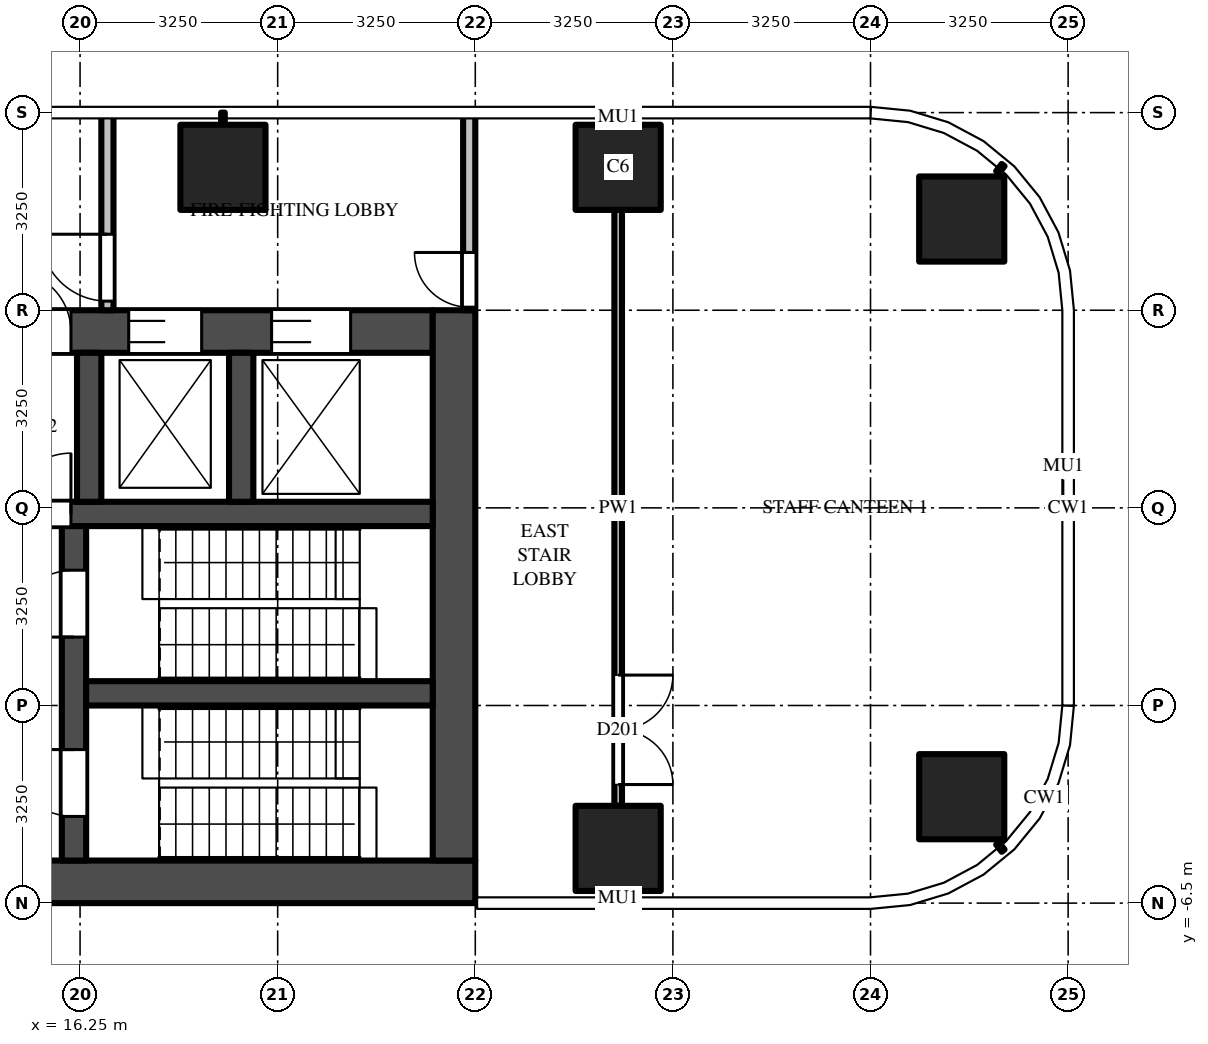
"""IFC4 building model, lengths in metres.
Left out: names, types, materials, properties, quantities, classifications, styles, units other than length and angle.
Written with IfcOpenShell. Run it as: python <this file> out.ifc"""

import sys

from ifc_helpers import new_model, si_unit, direction, frame, frame_2d, origin, origin_2d, place, context, subcontext, project, spatial, rectangle, extrude, source, transform, mapped, element, fill, save


model = new_model("IFC4")
c1 = context("Model", 3, precision=1e-05, world=origin(), true_north=direction((0.0, 1.0)))
c2 = subcontext(c1, "Body", "Model", "MODEL_VIEW")
j1 = project(units=[si_unit("LENGTHUNIT", "METRE"), si_unit("PLANEANGLEUNIT", "RADIAN")], contexts=[c1])
p1 = place(None, origin())
s1 = spatial("IfcSite", under=j1, at=p1, CompositionType="ELEMENT")
p2 = place(p1, origin())
s2 = spatial("IfcBuilding", under=s1, at=p2, CompositionType="ELEMENT")
p3 = place(p2, frame((0.0, 0.0, 83.5)))
s3 = spatial("IfcBuildingStorey", under=s2, at=p3, CompositionType="ELEMENT", Elevation=83.5)
m1 = source(origin(), c2, "Body", "SweptSolid", [
    extrude(rectangle(XDim=1.4, YDim=1.4, at=origin_2d()), origin(), (0.0, 0.0, 1.0), 4.5),
])
for number, where, z_axis, x_axis in (
    (1, (18.6, 5.6, 0.0), (0.0, 0.0, 1.0), (1.0, 0.0, 0.0)),
    (2, (25.1, 5.6, 0.0), (0.0, 0.0, 1.0), (1.0, 0.0, 0.0)),
    (3, (30.75, 4.75, 0.0), (0.0, 0.0, 1.0), (1.0, 0.0, 0.0)),
    (4, (25.1, -5.6, 0.0), (0.0, 0.0, 1.0), (1.0, 0.0, 0.0)),
    (5, (30.75, -4.75, 0.0), (0.0, 0.0, 1.0), (1.0, 0.0, 0.0)),
):
    element("IfcColumn", number, at=place(p3, frame(where, z_axis=z_axis, x_axis=x_axis)), inside=s3, PredefinedType="COLUMN", context=c2, shape_type="MappedRepresentation", body=[
        mapped(m1, transform((0.0, 0.0, 0.0))),
    ])
m2 = source(origin(), c2, "Body", "SweptSolid", [
    extrude(rectangle(XDim=16.45, YDim=0.7, at=frame_2d((8.225, 0.0))), origin(), (0.0, 0.0, 1.0), 4.25),
])
p4 = place(p3, frame((6.3, -6.15, 0.0), z_axis=(0.0, 0.0, 1.0), x_axis=(1.0, 0.0, 0.0)))
e6 = element("IfcWall", 6, at=p4, inside=s3, PredefinedType="SHEAR", context=c2, shape_type="MappedRepresentation", body=[
    mapped(m2, transform((0.0, 0.0, 0.0))),
])
m3 = source(origin(), c2, "Body", "SweptSolid", [
    extrude(rectangle(XDim=14.85, YDim=0.7, at=frame_2d((7.425, 0.0))), origin(), (0.0, 0.0, 1.0), 4.25),
])
p5 = place(p3, frame((7.2, 2.9, 0.0), z_axis=(0.0, 0.0, 1.0), x_axis=(1.0, 0.0, 0.0)))
e7 = element("IfcWall", 7, at=p5, inside=s3, PredefinedType="SHEAR", context=c2, shape_type="MappedRepresentation", body=[
    mapped(m3, transform((0.0, 0.0, 0.0))),
])
m4 = source(origin(), c2, "Body", "SweptSolid", [
    extrude(rectangle(XDim=1.3, YDim=2.1, at=frame_2d((0.65, 1.05))), frame((0.0, 0.36, 0.0), z_axis=(0.0, -1.0, 0.0), x_axis=(1.0, 0.0, 0.0)), (0.0, 0.0, 1.0), 0.72),
])
p6 = place(p5, frame((12.2, 0.0, 0.0)))
e8 = element("IfcOpeningElement", 8, at=p6, cuts=e7, PredefinedType="OPENING", context=c2, shape_type="MappedRepresentation", body=[
    mapped(m4, transform((0.0, 0.0, 0.0))),
])
m5 = source(origin(), c2, "Body", "SweptSolid", [
    extrude(rectangle(XDim=1.2, YDim=2.1, at=frame_2d((0.6, 1.05))), frame((0.0, 0.36, 0.0), z_axis=(0.0, -1.0, 0.0), x_axis=(1.0, 0.0, 0.0)), (0.0, 0.0, 1.0), 0.72),
])
p7 = place(p5, frame((9.85, 0.0, 0.0)))
e9 = element("IfcOpeningElement", 9, at=p7, cuts=e7, PredefinedType="OPENING", context=c2, shape_type="MappedRepresentation", body=[
    mapped(m5, transform((0.0, 0.0, 0.0))),
])
m6 = source(origin(), c2, "Body", "SweptSolid", [
    extrude(rectangle(XDim=1.0, YDim=2.1, at=frame_2d((0.5, 1.05))), frame((0.0, 0.36, 0.0), z_axis=(0.0, -1.0, 0.0), x_axis=(1.0, 0.0, 0.0)), (0.0, 0.0, 1.0), 0.72),
])
p8 = place(p5, frame((7.9, 0.0, 0.0)))
e10 = element("IfcOpeningElement", 10, at=p8, cuts=e7, PredefinedType="OPENING", context=c2, shape_type="MappedRepresentation", body=[
    mapped(m6, transform((0.0, 0.0, 0.0))),
])
m7 = source(origin(), c2, "Body", "SweptSolid", [
    extrude(rectangle(XDim=0.8, YDim=2.1, at=frame_2d((0.4, 1.05))), frame((0.0, 0.36, 0.0), z_axis=(0.0, -1.0, 0.0), x_axis=(1.0, 0.0, 0.0)), (0.0, 0.0, 1.0), 0.72),
])
p9 = place(p5, frame((0.113, 0.0, 0.0)))
e11 = element("IfcOpeningElement", 11, at=p9, cuts=e7, PredefinedType="OPENING", context=c2, shape_type="MappedRepresentation", body=[
    mapped(m7, transform((0.0, 0.0, 0.0))),
])
p10 = place(p5, frame((1.288, 0.0, 0.0)))
e12 = element("IfcOpeningElement", 12, at=p10, cuts=e7, PredefinedType="OPENING", context=c2, shape_type="MappedRepresentation", body=[
    mapped(m7, transform((0.0, 0.0, 0.0))),
])
p11 = place(p5, frame((2.712, 0.0, 0.0)))
e13 = element("IfcOpeningElement", 13, at=p11, cuts=e7, PredefinedType="OPENING", context=c2, shape_type="MappedRepresentation", body=[
    mapped(m7, transform((0.0, 0.0, 0.0))),
])
p12 = place(p5, frame((3.887, 0.0, 0.0)))
e14 = element("IfcOpeningElement", 14, at=p12, cuts=e7, PredefinedType="OPENING", context=c2, shape_type="MappedRepresentation", body=[
    mapped(m7, transform((0.0, 0.0, 0.0))),
])
p13 = place(p5, frame((5.312, 0.0, 0.0)))
e15 = element("IfcOpeningElement", 15, at=p13, cuts=e7, PredefinedType="OPENING", context=c2, shape_type="MappedRepresentation", body=[
    mapped(m7, transform((0.0, 0.0, 0.0))),
])
p14 = place(p5, frame((6.488, 0.0, 0.0)))
e16 = element("IfcOpeningElement", 16, at=p14, cuts=e7, PredefinedType="OPENING", context=c2, shape_type="MappedRepresentation", body=[
    mapped(m7, transform((0.0, 0.0, 0.0))),
])
m8 = source(origin(), c2, "Body", "SweptSolid", [
    extrude(rectangle(XDim=9.05, YDim=0.7, at=frame_2d((4.525, 0.0))), origin(), (0.0, 0.0, 1.0), 4.25),
])
p15 = place(p3, frame((22.4, -5.8, 0.0), z_axis=(0.0, 0.0, 1.0), x_axis=(0.0, 1.0, 0.0)))
e17 = element("IfcWall", 17, at=p15, inside=s3, PredefinedType="SHEAR", context=c2, shape_type="MappedRepresentation", body=[
    mapped(m8, transform((0.0, 0.0, 0.0))),
])
m9 = source(origin(), c2, "Body", "SweptSolid", [
    extrude(rectangle(XDim=14.85, YDim=0.4, at=frame_2d((7.425, 0.0))), origin(), (0.0, 0.0, 1.0), 4.25),
])
p16 = place(p3, frame((7.2, -0.1, 0.0), z_axis=(0.0, 0.0, 1.0), x_axis=(1.0, 0.0, 0.0)))
e18 = element("IfcWall", 18, at=p16, inside=s3, PredefinedType="SHEAR", context=c2, shape_type="MappedRepresentation", body=[
    mapped(m9, transform((0.0, 0.0, 0.0))),
])
m10 = source(origin(), c2, "Body", "SweptSolid", [
    extrude(rectangle(XDim=1.0, YDim=2.1, at=frame_2d((0.5, 1.05))), frame((0.0, 0.21, 0.0), z_axis=(0.0, -1.0, 0.0), x_axis=(1.0, 0.0, 0.0)), (0.0, 0.0, 1.0), 0.42),
])
p17 = place(p16, frame((7.9, 0.0, 0.0)))
e19 = element("IfcOpeningElement", 19, at=p17, cuts=e18, PredefinedType="OPENING", context=c2, shape_type="MappedRepresentation", body=[
    mapped(m10, transform((0.0, 0.0, 0.0))),
])
m11 = source(origin(), c2, "Body", "SweptSolid", [
    extrude(rectangle(XDim=5.5, YDim=0.4, at=frame_2d((2.75, 0.0))), origin(), (0.0, 0.0, 1.0), 4.25),
])
p18 = place(p3, frame((16.15, -5.8, 0.0), z_axis=(0.0, 0.0, 1.0), x_axis=(0.0, 1.0, 0.0)))
e20 = element("IfcWall", 20, at=p18, inside=s3, PredefinedType="SHEAR", context=c2, shape_type="MappedRepresentation", body=[
    mapped(m11, transform((0.0, 0.0, 0.0))),
])
m12 = source(origin(), c2, "Body", "SweptSolid", [
    extrude(rectangle(XDim=1.1, YDim=2.1, at=frame_2d((0.55, 1.05))), frame((0.0, 0.21, 0.0), z_axis=(0.0, -1.0, 0.0), x_axis=(1.0, 0.0, 0.0)), (0.0, 0.0, 1.0), 0.42),
])
p19 = place(p18, frame((0.725, 0.0, 0.0)))
e21 = element("IfcOpeningElement", 21, at=p19, cuts=e20, PredefinedType="OPENING", context=c2, shape_type="MappedRepresentation", body=[
    mapped(m12, transform((0.0, 0.0, 0.0))),
])
p20 = place(p18, frame((3.675, 0.0, 0.0)))
e22 = element("IfcOpeningElement", 22, at=p20, cuts=e20, PredefinedType="OPENING", context=c2, shape_type="MappedRepresentation", body=[
    mapped(m12, transform((0.0, 0.0, 0.0))),
])
m13 = source(origin(), c2, "Body", "SweptSolid", [
    extrude(rectangle(XDim=5.7, YDim=0.4, at=frame_2d((2.85, 0.0))), origin(), (0.0, 0.0, 1.0), 4.25),
])
p21 = place(p3, frame((16.35, -3.05, 0.0), z_axis=(0.0, 0.0, 1.0), x_axis=(1.0, 0.0, 0.0)))
e23 = element("IfcWall", 23, at=p21, inside=s3, PredefinedType="SHEAR", context=c2, shape_type="MappedRepresentation", body=[
    mapped(m13, transform((0.0, 0.0, 0.0))),
])
m14 = source(origin(), c2, "Body", "SweptSolid", [
    extrude(rectangle(XDim=2.45, YDim=0.4, at=frame_2d((1.225, 0.0))), origin(), (0.0, 0.0, 1.0), 4.25),
])
for number, where, z_axis, x_axis in (
    (24, (16.4, 0.1, 0.0), (0.0, 0.0, 1.0), (0.0, 1.0, 0.0)),
    (25, (18.9, 0.1, 0.0), (0.0, 0.0, 1.0), (0.0, 1.0, 0.0)),
):
    element("IfcWall", number, at=place(p3, frame(where, z_axis=z_axis, x_axis=x_axis)), inside=s3, PredefinedType="SHEAR", context=c2, shape_type="MappedRepresentation", body=[
        mapped(m14, transform((0.0, 0.0, 0.0))),
    ])
m15 = source(origin(), c2, "Body", "SweptSolid", [
    extrude(rectangle(XDim=3.25, YDim=0.2, at=frame_2d((1.625, 0.0))), origin(), (0.0, 0.0, 1.0), 4.25),
])
p22 = place(p3, frame((16.7, 3.25, 0.0), z_axis=(0.0, 0.0, 1.0), x_axis=(0.0, 1.0, 0.0)))
e26 = element("IfcWall", 26, at=p22, inside=s3, PredefinedType="PARTITIONING", context=c2, shape_type="MappedRepresentation", body=[
    mapped(m15, transform((0.0, 0.0, 0.0))),
])
m16 = source(origin(), c2, "Body", "SweptSolid", [
    extrude(rectangle(XDim=1.1, YDim=2.1, at=frame_2d((0.55, 1.05))), frame((0.0, 0.11, 0.0), z_axis=(0.0, -1.0, 0.0), x_axis=(1.0, 0.0, 0.0)), (0.0, 0.0, 1.0), 0.22),
])
p23 = place(p22, frame((0.15, 0.0, 0.0)))
e27 = element("IfcOpeningElement", 27, at=p23, cuts=e26, PredefinedType="OPENING", context=c2, shape_type="MappedRepresentation", body=[
    mapped(m16, transform((0.0, 0.0, 0.0))),
])
p24 = place(p3, frame((22.65, 3.25, 0.0), z_axis=(0.0, 0.0, 1.0), x_axis=(0.0, 1.0, 0.0)))
e28 = element("IfcWall", 28, at=p24, inside=s3, PredefinedType="PARTITIONING", context=c2, shape_type="MappedRepresentation", body=[
    mapped(m15, transform((0.0, 0.0, 0.0))),
])
m17 = source(origin(), c2, "Body", "SweptSolid", [
    extrude(rectangle(XDim=0.9, YDim=2.1, at=frame_2d((0.45, 1.05))), frame((0.0, 0.11, 0.0), z_axis=(0.0, -1.0, 0.0), x_axis=(1.0, 0.0, 0.0)), (0.0, 0.0, 1.0), 0.22),
])
p25 = place(p24, frame((0.05, 0.0, 0.0)))
e29 = element("IfcOpeningElement", 29, at=p25, cuts=e28, PredefinedType="OPENING", context=c2, shape_type="MappedRepresentation", body=[
    mapped(m17, transform((0.0, 0.0, 0.0))),
])
m18 = source(origin(), c2, "Body", "SweptSolid", [
    extrude(rectangle(XDim=9.8, YDim=0.125, at=frame_2d((4.9, 0.0))), origin(), (0.0, 0.0, 1.0), 3.468),
])
p26 = place(p3, frame((25.1, 4.9, 0.0), z_axis=(0.0, 0.0, 1.0), x_axis=(0.0, -1.0, 0.0)))
e30 = element("IfcWall", 30, at=p26, inside=s3, PredefinedType="PARTITIONING", context=c2, shape_type="MappedRepresentation", body=[
    mapped(m18, transform((0.0, 0.0, 0.0))),
])
m19 = source(origin(), c2, "Body", "SweptSolid", [
    extrude(rectangle(XDim=1.8, YDim=2.1, at=frame_2d((0.9, 1.05))), frame((0.0, 0.073, 0.0), z_axis=(0.0, -1.0, 0.0), x_axis=(1.0, 0.0, 0.0)), (0.0, 0.0, 1.0), 0.145),
])
p27 = place(p26, frame((7.65, 0.0, 0.0)))
e31 = element("IfcOpeningElement", 31, at=p27, cuts=e30, PredefinedType="OPENING", context=c2, shape_type="MappedRepresentation", body=[
    mapped(m19, transform((0.0, 0.0, 0.0))),
])
m20 = source(origin(), c2, "Body", "SweptSolid", [
    extrude(rectangle(XDim=1.3, YDim=2.1, at=frame_2d((0.65, 1.05))), frame((0.0, -0.275, 0.0), z_axis=(0.0, -1.0, 0.0), x_axis=(1.0, 0.0, 0.0)), (0.0, 0.0, 1.0), 0.05),
])
p28 = place(p6, origin())
e32 = element("IfcDoor", 32, at=p28, inside=s3, OperationType="DOUBLE_DOOR_SLIDING", PredefinedType="DOOR", context=c2, shape_type="MappedRepresentation", body=[
    mapped(m20, transform((0.0, 0.0, 0.0))),
])
fill(e8, e32)
m21 = source(origin(), c2, "Body", "SweptSolid", [
    extrude(rectangle(XDim=1.2, YDim=2.1, at=frame_2d((0.6, 1.05))), frame((0.0, -0.275, 0.0), z_axis=(0.0, -1.0, 0.0), x_axis=(1.0, 0.0, 0.0)), (0.0, 0.0, 1.0), 0.05),
])
p29 = place(p7, origin())
e33 = element("IfcDoor", 33, at=p29, inside=s3, OperationType="DOUBLE_DOOR_SLIDING", PredefinedType="DOOR", context=c2, shape_type="MappedRepresentation", body=[
    mapped(m21, transform((0.0, 0.0, 0.0))),
])
fill(e9, e33)
m22 = source(origin(), c2, "Body", "SweptSolid", [
    extrude(rectangle(XDim=1.1, YDim=2.1, at=frame_2d((0.55, 1.05))), frame((0.0, 0.025, 0.0), z_axis=(0.0, -1.0, 0.0), x_axis=(1.0, 0.0, 0.0)), (0.0, 0.0, 1.0), 0.05),
])
p30 = place(p19, origin())
e34 = element("IfcDoor", 34, at=p30, inside=s3, OperationType="SINGLE_SWING_RIGHT", PredefinedType="DOOR", context=c2, shape_type="MappedRepresentation", body=[
    mapped(m22, transform((0.0, 0.0, 0.0))),
])
fill(e21, e34)
p31 = place(p20, origin())
e35 = element("IfcDoor", 35, at=p31, inside=s3, OperationType="SINGLE_SWING_LEFT", PredefinedType="DOOR", context=c2, shape_type="MappedRepresentation", body=[
    mapped(m22, transform((0.0, 0.0, 0.0))),
])
fill(e22, e35)
m23 = source(origin(), c2, "Body", "SweptSolid", [
    extrude(rectangle(XDim=1.0, YDim=2.1, at=frame_2d((0.5, 1.05))), frame((0.0, 0.025, 0.0), z_axis=(0.0, -1.0, 0.0), x_axis=(1.0, 0.0, 0.0)), (0.0, 0.0, 1.0), 0.05),
])
p32 = place(p17, origin())
e36 = element("IfcDoor", 36, at=p32, inside=s3, OperationType="SINGLE_SWING_RIGHT", PredefinedType="DOOR", context=c2, shape_type="MappedRepresentation", body=[
    mapped(m23, transform((0.0, 0.0, 0.0))),
])
fill(e19, e36)
m24 = source(origin(), c2, "Body", "SweptSolid", [
    extrude(rectangle(XDim=1.0, YDim=2.1, at=frame_2d((0.5, 1.05))), frame((0.0, -0.275, 0.0), z_axis=(0.0, -1.0, 0.0), x_axis=(1.0, 0.0, 0.0)), (0.0, 0.0, 1.0), 0.05),
])
p33 = place(p8, origin())
e37 = element("IfcDoor", 37, at=p33, inside=s3, OperationType="SINGLE_SWING_LEFT", PredefinedType="DOOR", context=c2, shape_type="MappedRepresentation", body=[
    mapped(m24, transform((0.0, 0.0, 0.0))),
])
fill(e10, e37)
p34 = place(p23, origin())
e38 = element("IfcDoor", 38, at=p34, inside=s3, OperationType="SINGLE_SWING_RIGHT", PredefinedType="DOOR", context=c2, shape_type="MappedRepresentation", body=[
    mapped(m22, transform((0.0, 0.0, 0.0))),
])
fill(e27, e38)
m25 = source(origin(), c2, "Body", "SweptSolid", [
    extrude(rectangle(XDim=0.9, YDim=2.1, at=frame_2d((0.45, 1.05))), frame((0.0, 0.025, 0.0), z_axis=(0.0, -1.0, 0.0), x_axis=(1.0, 0.0, 0.0)), (0.0, 0.0, 1.0), 0.05),
])
p35 = place(p25, origin())
e39 = element("IfcDoor", 39, at=p35, inside=s3, OperationType="SINGLE_SWING_RIGHT", PredefinedType="DOOR", context=c2, shape_type="MappedRepresentation", body=[
    mapped(m25, transform((0.0, 0.0, 0.0))),
])
fill(e29, e39)
m26 = source(origin(), c2, "Body", "SweptSolid", [
    extrude(rectangle(XDim=1.8, YDim=2.1, at=frame_2d((0.9, 1.05))), frame((0.0, 0.025, 0.0), z_axis=(0.0, -1.0, 0.0), x_axis=(1.0, 0.0, 0.0)), (0.0, 0.0, 1.0), 0.05),
])
p36 = place(p27, origin())
e40 = element("IfcDoor", 40, at=p36, inside=s3, OperationType="DOUBLE_DOOR_SINGLE_SWING", PredefinedType="DOOR", context=c2, shape_type="MappedRepresentation", body=[
    mapped(m26, transform((0.0, 0.0, 0.0))),
])
fill(e31, e40)
save(model, sys.argv[1])
